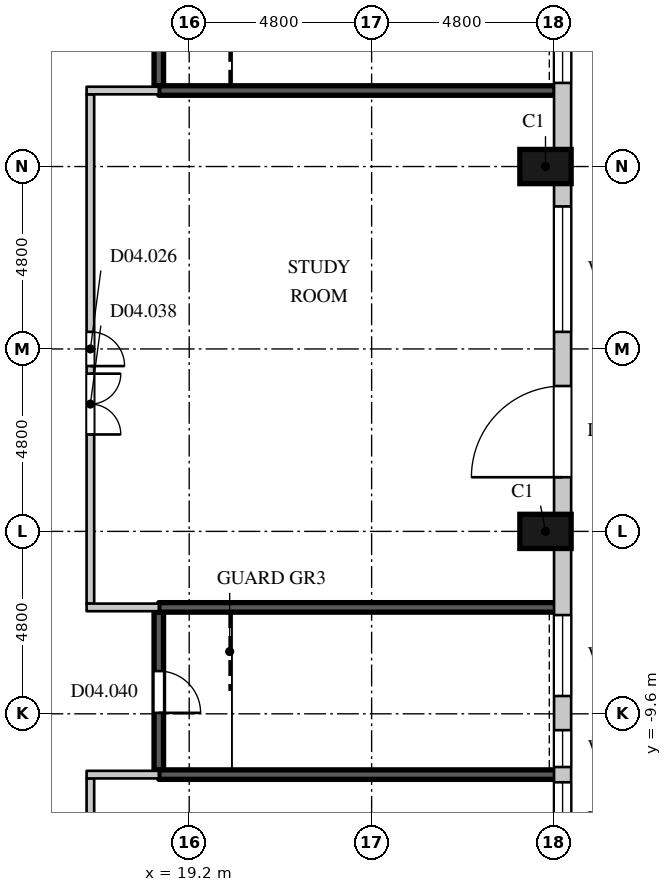
"""IFC4 building model, lengths in metres.
Left out: names, types, materials, properties, quantities, classifications, styles, units other than length and angle.
Written with IfcOpenShell. Run it as: python <this file> out.ifc"""

import sys

from ifc_helpers import new_model, si_unit, direction, frame, frame_2d, origin, origin_2d, place, context, subcontext, project, spatial, rectangle, extrude, element, fill, save


model = new_model("IFC4")
c1 = context("Model", 3, precision=1e-05, world=origin(), true_north=direction((0.0, 1.0)))
c2 = subcontext(c1, "Body", "Model", "MODEL_VIEW")
j1 = project(units=[si_unit("LENGTHUNIT", "METRE"), si_unit("PLANEANGLEUNIT", "RADIAN")], contexts=[c1])
p1 = place(None, origin())
s1 = spatial("IfcSite", under=j1, at=p1, CompositionType="ELEMENT")
p2 = place(p1, origin())
s2 = spatial("IfcBuilding", under=s1, at=p2, CompositionType="ELEMENT")
p3 = place(p2, frame((0.0, 0.0, 21.0)))
s3 = spatial("IfcBuildingStorey", under=s2, at=p3, CompositionType="ELEMENT", Elevation=21.0)
for number, where, z_axis, x_axis in (
    (1, (28.575, -4.8, 0.0), (0.0, 0.0, 1.0), (0.0, 1.0, 0.0)),
    (2, (28.575, 4.8, 0.0), (0.0, 0.0, 1.0), (0.0, 1.0, 0.0)),
):
    element("IfcColumn", number, at=place(p3, frame(where, z_axis=z_axis, x_axis=x_axis)), inside=s3, PredefinedType="COLUMN", context=c2, shape_type="SweptSolid", body=[
        extrude(rectangle(XDim=0.9, YDim=1.35, at=origin_2d()), origin(), (0.0, 0.0, 1.0), 4.5),
    ])
p4 = place(p3, frame((29.025, -13.913, 0.9), z_axis=(0.0, 0.0, 1.0), x_axis=(0.0, 1.0, 0.0)))
e3 = element("IfcWall", 3, at=p4, inside=s3, PredefinedType="ELEMENTEDWALL", context=c2, shape_type="SweptSolid", body=[
    extrude(rectangle(XDim=8.663, YDim=0.45, at=frame_2d((4.332, 0.0))), origin(), (0.0, 0.0, 1.0), 3.3),
])
p5 = place(p4, frame((0.582, 0.0, 0.15)))
e4 = element("IfcOpeningElement", 4, at=p5, cuts=e3, PredefinedType="OPENING", context=c2, shape_type="SweptSolid", body=[
    extrude(rectangle(XDim=1.93, YDim=2.7, at=frame_2d((0.965, 1.35))), frame((0.0, 0.235, 0.0), z_axis=(0.0, -1.0, 0.0), x_axis=(1.0, 0.0, 0.0)), (0.0, 0.0, 1.0), 0.47),
])
p6 = place(p4, frame((2.913, 0.0, 0.15)))
e5 = element("IfcOpeningElement", 5, at=p6, cuts=e3, PredefinedType="OPENING", context=c2, shape_type="SweptSolid", body=[
    extrude(rectangle(XDim=0.97, YDim=2.7, at=frame_2d((0.485, 1.35))), frame((0.0, 0.235, 0.0), z_axis=(0.0, -1.0, 0.0), x_axis=(1.0, 0.0, 0.0)), (0.0, 0.0, 1.0), 0.47),
])
p7 = place(p4, frame((4.781, 0.0, 0.15)))
e6 = element("IfcOpeningElement", 6, at=p7, cuts=e3, PredefinedType="OPENING", context=c2, shape_type="SweptSolid", body=[
    extrude(rectangle(XDim=2.13, YDim=2.7, at=frame_2d((1.065, 1.35))), frame((0.0, 0.235, 0.0), z_axis=(0.0, -1.0, 0.0), x_axis=(1.0, 0.0, 0.0)), (0.0, 0.0, 1.0), 0.47),
])
p8 = place(p3, frame((29.025, -4.35, 0.0), z_axis=(0.0, 0.0, 1.0), x_axis=(0.0, 1.0, 0.0)))
e7 = element("IfcWall", 7, at=p8, inside=s3, PredefinedType="ELEMENTEDWALL", context=c2, shape_type="SweptSolid", body=[
    extrude(rectangle(XDim=8.7, YDim=0.45, at=frame_2d((4.35, 0.0))), origin(), (0.0, 0.0, 1.0), 4.2),
])
p9 = place(p8, frame((0.975, 0.0, 0.0)))
e8 = element("IfcOpeningElement", 8, at=p9, cuts=e7, PredefinedType="OPENING", context=c2, shape_type="SweptSolid", body=[
    extrude(rectangle(XDim=2.4, YDim=2.7, at=frame_2d((1.2, 1.35))), frame((0.0, 0.235, 0.0), z_axis=(0.0, -1.0, 0.0), x_axis=(1.0, 0.0, 0.0)), (0.0, 0.0, 1.0), 0.47),
])
p10 = place(p8, frame((4.8, 0.0, 1.05)))
e9 = element("IfcOpeningElement", 9, at=p10, cuts=e7, PredefinedType="OPENING", context=c2, shape_type="SweptSolid", body=[
    extrude(rectangle(XDim=3.3, YDim=2.7, at=frame_2d((1.65, 1.35))), frame((0.0, 0.235, 0.0), z_axis=(0.0, -1.0, 0.0), x_axis=(1.0, 0.0, 0.0)), (0.0, 0.0, 1.0), 0.47),
])
p11 = place(p3, frame((29.025, 5.25, 0.9), z_axis=(0.0, 0.0, 1.0), x_axis=(0.0, 1.0, 0.0)))
e10 = element("IfcWall", 10, at=p11, inside=s3, PredefinedType="ELEMENTEDWALL", context=c2, shape_type="SweptSolid", body=[
    extrude(rectangle(XDim=8.663, YDim=0.45, at=frame_2d((4.332, 0.0))), origin(), (0.0, 0.0, 1.0), 3.3),
])
p12 = place(p11, frame((1.75, 0.0, 0.15)))
e11 = element("IfcOpeningElement", 11, at=p12, cuts=e10, PredefinedType="OPENING", context=c2, shape_type="SweptSolid", body=[
    extrude(rectangle(XDim=2.13, YDim=2.7, at=frame_2d((1.065, 1.35))), frame((0.0, 0.235, 0.0), z_axis=(0.0, -1.0, 0.0), x_axis=(1.0, 0.0, 0.0)), (0.0, 0.0, 1.0), 0.47),
])
p13 = place(p11, frame((4.781, 0.0, 0.15)))
e12 = element("IfcOpeningElement", 12, at=p13, cuts=e10, PredefinedType="OPENING", context=c2, shape_type="SweptSolid", body=[
    extrude(rectangle(XDim=0.97, YDim=2.7, at=frame_2d((0.485, 1.35))), frame((0.0, 0.235, 0.0), z_axis=(0.0, -1.0, 0.0), x_axis=(1.0, 0.0, 0.0)), (0.0, 0.0, 1.0), 0.47),
])
p14 = place(p11, frame((6.15, 0.0, 0.15)))
e13 = element("IfcOpeningElement", 13, at=p14, cuts=e10, PredefinedType="OPENING", context=c2, shape_type="SweptSolid", body=[
    extrude(rectangle(XDim=1.93, YDim=2.7, at=frame_2d((0.965, 1.35))), frame((0.0, 0.235, 0.0), z_axis=(0.0, -1.0, 0.0), x_axis=(1.0, 0.0, 0.0)), (0.0, 0.0, 1.0), 0.47),
])
p15 = place(p3, frame((16.6, -13.813, 0.0), z_axis=(0.0, 0.0, 1.0), x_axis=(0.0, 1.0, 0.0)))
e14 = element("IfcWall", 14, at=p15, inside=s3, PredefinedType="PARTITIONING", context=c2, shape_type="SweptSolid", body=[
    extrude(rectangle(XDim=2.513, YDim=0.2, at=frame_2d((1.257, 0.0))), origin(), (0.0, 0.0, 1.0), 4.25),
])
p16 = place(p3, frame((16.5, -11.2, 0.0), z_axis=(0.0, 0.0, 1.0), x_axis=(1.0, 0.0, 0.0)))
e15 = element("IfcWall", 15, at=p16, inside=s3, PredefinedType="PARTITIONING", context=c2, shape_type="SweptSolid", body=[
    extrude(rectangle(XDim=1.9, YDim=0.2, at=frame_2d((0.95, 0.0))), origin(), (0.0, 0.0, 1.0), 3.55),
])
p17 = place(p3, frame((16.6, -6.7, 0.0), z_axis=(0.0, 0.0, 1.0), x_axis=(0.0, 1.0, 0.0)))
e16 = element("IfcWall", 16, at=p17, inside=s3, PredefinedType="PARTITIONING", context=c2, shape_type="SweptSolid", body=[
    extrude(rectangle(XDim=13.4, YDim=0.2, at=frame_2d((6.7, 0.0))), origin(), (0.0, 0.0, 1.0), 4.25),
])
p18 = place(p17, frame((6.25, 0.0, 0.0)))
e17 = element("IfcOpeningElement", 17, at=p18, cuts=e16, PredefinedType="OPENING", context=c2, shape_type="SweptSolid", body=[
    extrude(rectangle(XDim=0.9, YDim=2.2, at=frame_2d((0.45, 1.1))), frame((0.0, 0.11, 0.0), z_axis=(0.0, -1.0, 0.0), x_axis=(1.0, 0.0, 0.0)), (0.0, 0.0, 1.0), 0.22),
])
p19 = place(p17, frame((4.45, 0.0, 0.0)))
e18 = element("IfcOpeningElement", 18, at=p19, cuts=e16, PredefinedType="OPENING", context=c2, shape_type="SweptSolid", body=[
    extrude(rectangle(XDim=1.6, YDim=2.4, at=frame_2d((0.8, 1.2))), frame((0.0, 0.11, 0.0), z_axis=(0.0, -1.0, 0.0), x_axis=(1.0, 0.0, 0.0)), (0.0, 0.0, 1.0), 0.22),
])
for number, where, z_axis, x_axis in (
    (19, (16.5, -6.8, 0.0), (0.0, 0.0, 1.0), (1.0, 0.0, 0.0)),
    (20, (16.5, 6.8, 0.0), (0.0, 0.0, 1.0), (1.0, 0.0, 0.0)),
):
    element("IfcWall", number, at=place(p3, frame(where, z_axis=z_axis, x_axis=x_axis)), inside=s3, PredefinedType="PARTITIONING", context=c2, shape_type="SweptSolid", body=[
        extrude(rectangle(XDim=1.9, YDim=0.2, at=frame_2d((0.95, 0.0))), origin(), (0.0, 0.0, 1.0), 4.25),
    ])
p20 = place(p3, frame((18.4, -11.075, 0.0), z_axis=(0.0, 0.0, 1.0), x_axis=(0.0, 1.0, 0.0)))
e21 = element("IfcWall", 21, at=p20, inside=s3, PredefinedType="SHEAR", context=c2, shape_type="SweptSolid", body=[
    extrude(rectangle(XDim=4.15, YDim=0.25, at=frame_2d((2.075, 0.0))), origin(), (0.0, 0.0, 1.0), 4.25),
])
p21 = place(p20, frame((1.5, 0.0, 0.0)))
e22 = element("IfcOpeningElement", 22, at=p21, cuts=e21, PredefinedType="OPENING", context=c2, shape_type="SweptSolid", body=[
    extrude(rectangle(XDim=1.1, YDim=2.2, at=frame_2d((0.55, 1.1))), frame((0.0, 0.135, 0.0), z_axis=(0.0, -1.0, 0.0), x_axis=(1.0, 0.0, 0.0)), (0.0, 0.0, 1.0), 0.27),
])
for number, where, z_axis, x_axis in (
    (23, (18.4, -11.2, 0.0), (0.0, 0.0, 1.0), (1.0, 0.0, 0.0)),
    (24, (18.4, -6.8, 0.0), (0.0, 0.0, 1.0), (1.0, 0.0, 0.0)),
):
    element("IfcWall", number, at=place(p3, frame(where, z_axis=z_axis, x_axis=x_axis)), inside=s3, PredefinedType="SHEAR", context=c2, shape_type="SweptSolid", body=[
        extrude(rectangle(XDim=10.455, YDim=0.25, at=frame_2d((5.228, 0.0))), origin(), (0.0, 0.0, 1.0), 4.25),
    ])
p22 = place(p3, frame((18.4, 6.925, 0.0), z_axis=(0.0, 0.0, 1.0), x_axis=(0.0, 1.0, 0.0)))
e25 = element("IfcWall", 25, at=p22, inside=s3, PredefinedType="SHEAR", context=c2, shape_type="SweptSolid", body=[
    extrude(rectangle(XDim=4.15, YDim=0.25, at=frame_2d((2.075, 0.0))), origin(), (0.0, 0.0, 1.0), 4.25),
])
p23 = place(p22, frame((1.5, 0.0, 0.0)))
e26 = element("IfcOpeningElement", 26, at=p23, cuts=e25, PredefinedType="OPENING", context=c2, shape_type="SweptSolid", body=[
    extrude(rectangle(XDim=1.1, YDim=2.2, at=frame_2d((0.55, 1.1))), frame((0.0, 0.135, 0.0), z_axis=(0.0, -1.0, 0.0), x_axis=(1.0, 0.0, 0.0)), (0.0, 0.0, 1.0), 0.27),
])
p24 = place(p3, frame((18.4, 6.8, 0.0), z_axis=(0.0, 0.0, 1.0), x_axis=(1.0, 0.0, 0.0)))
e27 = element("IfcWall", 27, at=p24, inside=s3, PredefinedType="SHEAR", context=c2, shape_type="SweptSolid", body=[
    extrude(rectangle(XDim=10.425, YDim=0.25, at=frame_2d((5.212, 0.0))), origin(), (0.0, 0.0, 1.0), 4.25),
])
p25 = place(p5, origin())
e28 = element("IfcWindow", 28, at=p25, inside=s3, PartitioningType="SINGLE_PANEL", PredefinedType="WINDOW", context=c2, shape_type="SweptSolid", body=[
    extrude(rectangle(XDim=1.93, YDim=2.7, at=frame_2d((0.965, 1.35))), frame((0.0, 0.135, 0.0), z_axis=(0.0, -1.0, 0.0), x_axis=(1.0, 0.0, 0.0)), (0.0, 0.0, 1.0), 0.06),
])
fill(e4, e28)
p26 = place(p6, origin())
e29 = element("IfcWindow", 29, at=p26, inside=s3, PartitioningType="SINGLE_PANEL", PredefinedType="WINDOW", context=c2, shape_type="SweptSolid", body=[
    extrude(rectangle(XDim=0.97, YDim=2.7, at=frame_2d((0.485, 1.35))), frame((0.0, 0.135, 0.0), z_axis=(0.0, -1.0, 0.0), x_axis=(1.0, 0.0, 0.0)), (0.0, 0.0, 1.0), 0.06),
])
fill(e5, e29)
p27 = place(p7, origin())
e30 = element("IfcWindow", 30, at=p27, inside=s3, PartitioningType="SINGLE_PANEL", PredefinedType="WINDOW", context=c2, shape_type="SweptSolid", body=[
    extrude(rectangle(XDim=2.13, YDim=2.7, at=frame_2d((1.065, 1.35))), frame((0.0, 0.135, 0.0), z_axis=(0.0, -1.0, 0.0), x_axis=(1.0, 0.0, 0.0)), (0.0, 0.0, 1.0), 0.06),
])
fill(e6, e30)
p28 = place(p9, origin())
e31 = element("IfcDoor", 31, at=p28, inside=s3, OperationType="SINGLE_SWING_LEFT", PredefinedType="DOOR", context=c2, shape_type="SweptSolid", body=[
    extrude(rectangle(XDim=2.4, YDim=2.7, at=frame_2d((1.2, 1.35))), frame((0.0, 0.13, 0.0), z_axis=(0.0, -1.0, 0.0), x_axis=(1.0, 0.0, 0.0)), (0.0, 0.0, 1.0), 0.05),
])
fill(e8, e31)
p29 = place(p10, origin())
e32 = element("IfcWindow", 32, at=p29, inside=s3, PartitioningType="SINGLE_PANEL", PredefinedType="WINDOW", context=c2, shape_type="SweptSolid", body=[
    extrude(rectangle(XDim=3.3, YDim=2.7, at=frame_2d((1.65, 1.35))), frame((0.0, 0.135, 0.0), z_axis=(0.0, -1.0, 0.0), x_axis=(1.0, 0.0, 0.0)), (0.0, 0.0, 1.0), 0.06),
])
fill(e9, e32)
p30 = place(p12, origin())
e33 = element("IfcWindow", 33, at=p30, inside=s3, PartitioningType="SINGLE_PANEL", PredefinedType="WINDOW", context=c2, shape_type="SweptSolid", body=[
    extrude(rectangle(XDim=2.13, YDim=2.7, at=frame_2d((1.065, 1.35))), frame((0.0, 0.135, 0.0), z_axis=(0.0, -1.0, 0.0), x_axis=(1.0, 0.0, 0.0)), (0.0, 0.0, 1.0), 0.06),
])
fill(e11, e33)
p31 = place(p18, origin())
e34 = element("IfcDoor", 34, at=p31, inside=s3, OperationType="SINGLE_SWING_RIGHT", PredefinedType="DOOR", context=c2, shape_type="SweptSolid", body=[
    extrude(rectangle(XDim=0.9, YDim=2.2, at=frame_2d((0.45, 1.1))), frame((0.0, 0.025, 0.0), z_axis=(0.0, -1.0, 0.0), x_axis=(1.0, 0.0, 0.0)), (0.0, 0.0, 1.0), 0.05),
])
fill(e17, e34)
p32 = place(p19, origin())
e35 = element("IfcDoor", 35, at=p32, inside=s3, OperationType="DOUBLE_DOOR_SINGLE_SWING", PredefinedType="DOOR", context=c2, shape_type="SweptSolid", body=[
    extrude(rectangle(XDim=1.6, YDim=2.4, at=frame_2d((0.8, 1.2))), frame((0.0, 0.025, 0.0), z_axis=(0.0, -1.0, 0.0), x_axis=(1.0, 0.0, 0.0)), (0.0, 0.0, 1.0), 0.05),
])
fill(e18, e35)
p33 = place(p21, origin())
e36 = element("IfcDoor", 36, at=p33, inside=s3, OperationType="SINGLE_SWING_RIGHT", PredefinedType="DOOR", context=c2, shape_type="SweptSolid", body=[
    extrude(rectangle(XDim=1.1, YDim=2.2, at=frame_2d((0.55, 1.1))), frame((0.0, 0.025, 0.0), z_axis=(0.0, -1.0, 0.0), x_axis=(1.0, 0.0, 0.0)), (0.0, 0.0, 1.0), 0.05),
])
fill(e22, e36)
save(model, sys.argv[1])
